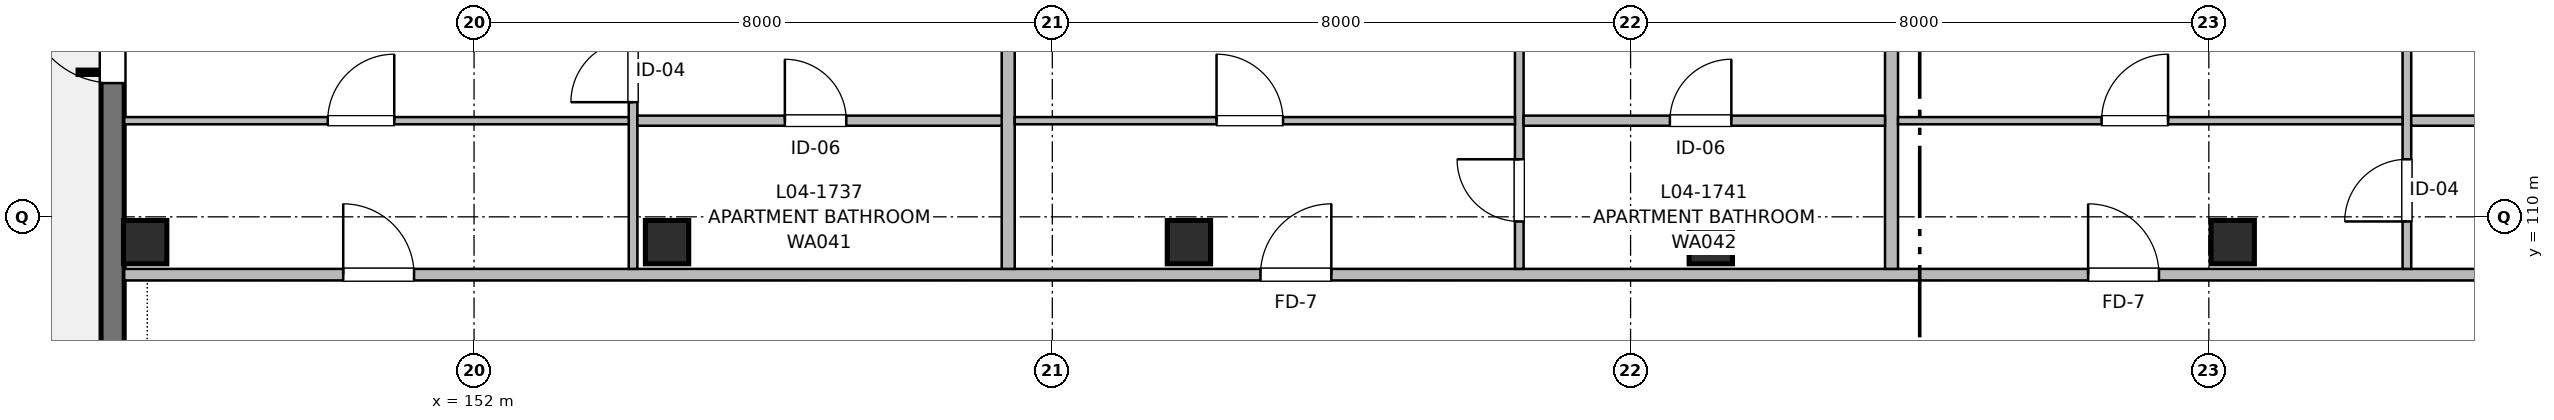
"""IFC4 building model, lengths in metres.
Left out: names, types, materials, properties, quantities, classifications, styles, units other than length and angle.
Written with IfcOpenShell. Run it as: python <this file> out.ifc"""

import sys

from ifc_helpers import new_model, si_unit, direction, frame, frame_2d, origin, origin_2d, place, context, subcontext, project, spatial, rectangle, extrude, element, fill, save


model = new_model("IFC4")
c1 = context("Model", 3, precision=1e-05, world=origin(), true_north=direction((0.0, 1.0)))
c2 = subcontext(c1, "Body", "Model", "MODEL_VIEW")
j1 = project(units=[si_unit("LENGTHUNIT", "METRE"), si_unit("PLANEANGLEUNIT", "RADIAN")], contexts=[c1])
p1 = place(None, origin())
s1 = spatial("IfcSite", under=j1, at=p1, CompositionType="ELEMENT")
p2 = place(p1, origin())
s2 = spatial("IfcBuilding", under=s1, at=p2, CompositionType="ELEMENT")
p3 = place(p2, frame((0.0, 0.0, 13.76)))
s3 = spatial("IfcBuildingStorey", under=s2, at=p3, CompositionType="ELEMENT", Elevation=13.76)
for number, where, z_axis, x_axis in (
    (1, (147.45, 109.65, 0.0), (0.0, 0.0, 1.0), (1.0, 0.0, 0.0)),
    (2, (154.67, 109.65, 0.0), (0.0, 0.0, 1.0), (1.0, 0.0, 0.0)),
    (3, (161.89, 109.65, 0.0), (0.0, 0.0, 1.0), (1.0, 0.0, 0.0)),
    (4, (169.11, 109.65, 0.0), (0.0, 0.0, 1.0), (1.0, 0.0, 0.0)),
    (5, (176.33, 109.65, 0.0), (0.0, 0.0, 1.0), (1.0, 0.0, 0.0)),
):
    element("IfcColumn", number, at=place(p3, frame(where, z_axis=z_axis, x_axis=x_axis)), inside=s3, PredefinedType="COLUMN", context=c2, shape_type="SweptSolid", body=[
        extrude(rectangle(XDim=0.6, YDim=0.6, at=origin_2d()), origin(), (0.0, 0.0, 1.0), 3.2),
    ])
p4 = place(p3, frame((147.0, 100.0, 0.0), z_axis=(0.0, 0.0, 1.0), x_axis=(0.0, 1.0, 0.0)))
e6 = element("IfcWall", 6, at=p4, inside=s3, PredefinedType="SHEAR", context=c2, shape_type="SweptSolid", body=[
    extrude(rectangle(XDim=16.0, YDim=0.32, at=frame_2d((8.0, 0.0))), origin(), (0.0, 0.0, 1.0), 2.98),
])
p5 = place(p4, frame((3.1, 0.0, 0.72)))
e7 = element("IfcOpeningElement", 7, at=p5, cuts=e6, PredefinedType="OPENING", context=c2, shape_type="SweptSolid", body=[
    extrude(rectangle(XDim=1.8, YDim=1.5, at=frame_2d((0.9, 0.75))), frame((0.0, 0.17, 0.0), z_axis=(0.0, -1.0, 0.0), x_axis=(1.0, 0.0, 0.0)), (0.0, 0.0, 1.0), 0.34),
])
p6 = place(p4, frame((11.85, 0.0, 0.0)))
e8 = element("IfcOpeningElement", 8, at=p6, cuts=e6, PredefinedType="OPENING", context=c2, shape_type="SweptSolid", body=[
    extrude(rectangle(XDim=1.2, YDim=2.2, at=frame_2d((0.6, 1.1))), frame((0.0, 0.17, 0.0), z_axis=(0.0, -1.0, 0.0), x_axis=(1.0, 0.0, 0.0)), (0.0, 0.0, 1.0), 0.34),
])
p7 = place(p3, frame((147.16, 109.2, 0.0), z_axis=(0.0, 0.0, 1.0), x_axis=(1.0, 0.0, 0.0)))
e9 = element("IfcWall", 9, at=p7, inside=s3, PredefinedType="PARTITIONING", context=c2, shape_type="SweptSolid", body=[
    extrude(rectangle(XDim=36.68, YDim=0.16, at=frame_2d((18.34, 0.0))), origin(), (0.0, 0.0, 1.0), 2.935),
])
p8 = place(p7, frame((3.03, 0.0, 0.0)))
e10 = element("IfcOpeningElement", 10, at=p8, cuts=e9, PredefinedType="OPENING", context=c2, shape_type="SweptSolid", body=[
    extrude(rectangle(XDim=0.98, YDim=2.15, at=frame_2d((0.49, 1.075))), frame((0.0, 0.09, 0.0), z_axis=(0.0, -1.0, 0.0), x_axis=(1.0, 0.0, 0.0)), (0.0, 0.0, 1.0), 0.18),
])
p9 = place(p7, frame((15.72, 0.0, 0.0)))
e11 = element("IfcOpeningElement", 11, at=p9, cuts=e9, PredefinedType="OPENING", context=c2, shape_type="SweptSolid", body=[
    extrude(rectangle(XDim=0.98, YDim=2.15, at=frame_2d((0.49, 1.075))), frame((0.0, 0.09, 0.0), z_axis=(0.0, -1.0, 0.0), x_axis=(1.0, 0.0, 0.0)), (0.0, 0.0, 1.0), 0.18),
])
p10 = place(p7, frame((27.17, 0.0, 0.0)))
e12 = element("IfcOpeningElement", 12, at=p10, cuts=e9, PredefinedType="OPENING", context=c2, shape_type="SweptSolid", body=[
    extrude(rectangle(XDim=0.98, YDim=2.15, at=frame_2d((0.49, 1.075))), frame((0.0, 0.09, 0.0), z_axis=(0.0, -1.0, 0.0), x_axis=(1.0, 0.0, 0.0)), (0.0, 0.0, 1.0), 0.18),
])
for number, where, z_axis, x_axis in (
    (13, (159.39, 109.28, 0.0), (0.0, 0.0, 1.0), (0.0, 1.0, 0.0)),
    (14, (171.61, 109.28, 0.0), (0.0, 0.0, 1.0), (0.0, 1.0, 0.0)),
):
    element("IfcWall", number, at=place(p3, frame(where, z_axis=z_axis, x_axis=x_axis)), inside=s3, PredefinedType="PARTITIONING", context=c2, shape_type="SweptSolid", body=[
        extrude(rectangle(XDim=6.6, YDim=0.18, at=frame_2d((3.3, 0.0))), origin(), (0.0, 0.0, 1.0), 2.935),
    ])
p11 = place(p3, frame((154.2, 109.28, 0.0), z_axis=(0.0, 0.0, 1.0), x_axis=(0.0, 1.0, 0.0)))
e15 = element("IfcWall", 15, at=p11, inside=s3, PredefinedType="PARTITIONING", context=c2, shape_type="SweptSolid", body=[
    extrude(rectangle(XDim=6.6, YDim=0.12, at=frame_2d((3.3, 0.0))), origin(), (0.0, 0.0, 1.0), 2.935),
])
p12 = place(p11, frame((2.306, 0.0, 0.0)))
e16 = element("IfcOpeningElement", 16, at=p12, cuts=e15, PredefinedType="OPENING", context=c2, shape_type="SweptSolid", body=[
    extrude(rectangle(XDim=0.86, YDim=2.1, at=frame_2d((0.43, 1.05))), frame((0.0, 0.07, 0.0), z_axis=(0.0, -1.0, 0.0), x_axis=(1.0, 0.0, 0.0)), (0.0, 0.0, 1.0), 0.14),
])
p13 = place(p11, frame((4.097, 0.0, 0.0)))
e17 = element("IfcOpeningElement", 17, at=p13, cuts=e15, PredefinedType="OPENING", context=c2, shape_type="SweptSolid", body=[
    extrude(rectangle(XDim=0.9, YDim=2.1, at=frame_2d((0.45, 1.05))), frame((0.0, 0.07, 0.0), z_axis=(0.0, -1.0, 0.0), x_axis=(1.0, 0.0, 0.0)), (0.0, 0.0, 1.0), 0.14),
])
p14 = place(p3, frame((154.26, 111.33, 0.0), z_axis=(0.0, 0.0, 1.0), x_axis=(1.0, 0.0, 0.0)))
e18 = element("IfcWall", 18, at=p14, inside=s3, PredefinedType="PARTITIONING", context=c2, shape_type="SweptSolid", body=[
    extrude(rectangle(XDim=5.04, YDim=0.14, at=frame_2d((2.52, 0.0))), origin(), (0.0, 0.0, 1.0), 2.935),
])
p15 = place(p14, frame((2.04, 0.0, 0.0)))
e19 = element("IfcOpeningElement", 19, at=p15, cuts=e18, PredefinedType="OPENING", context=c2, shape_type="SweptSolid", body=[
    extrude(rectangle(XDim=0.85, YDim=2.05, at=frame_2d((0.425, 1.025))), frame((0.0, 0.08, 0.0), z_axis=(0.0, -1.0, 0.0), x_axis=(1.0, 0.0, 0.0)), (0.0, 0.0, 1.0), 0.16),
])
p16 = place(p3, frame((147.16, 111.33, 0.0), z_axis=(0.0, 0.0, 1.0), x_axis=(1.0, 0.0, 0.0)))
e20 = element("IfcWall", 20, at=p16, inside=s3, PredefinedType="PARTITIONING", context=c2, shape_type="SweptSolid", body=[
    extrude(rectangle(XDim=6.98, YDim=0.1, at=frame_2d((3.49, 0.0))), origin(), (0.0, 0.0, 1.0), 2.935),
])
p17 = place(p16, frame((2.816, 0.0, 0.0)))
e21 = element("IfcOpeningElement", 21, at=p17, cuts=e20, PredefinedType="OPENING", context=c2, shape_type="SweptSolid", body=[
    extrude(rectangle(XDim=0.92, YDim=2.1, at=frame_2d((0.46, 1.05))), frame((0.0, 0.06, 0.0), z_axis=(0.0, -1.0, 0.0), x_axis=(1.0, 0.0, 0.0)), (0.0, 0.0, 1.0), 0.12),
])
p18 = place(p3, frame((166.46, 109.28, 0.0), z_axis=(0.0, 0.0, 1.0), x_axis=(0.0, 1.0, 0.0)))
e22 = element("IfcWall", 22, at=p18, inside=s3, PredefinedType="PARTITIONING", context=c2, shape_type="SweptSolid", body=[
    extrude(rectangle(XDim=6.6, YDim=0.12, at=frame_2d((3.3, 0.0))), origin(), (0.0, 0.0, 1.0), 2.935),
])
p19 = place(p18, frame((0.656, 0.0, 0.0)))
e23 = element("IfcOpeningElement", 23, at=p19, cuts=e22, PredefinedType="OPENING", context=c2, shape_type="SweptSolid", body=[
    extrude(rectangle(XDim=0.86, YDim=2.1, at=frame_2d((0.43, 1.05))), frame((0.0, 0.07, 0.0), z_axis=(0.0, -1.0, 0.0), x_axis=(1.0, 0.0, 0.0)), (0.0, 0.0, 1.0), 0.14),
])
p20 = place(p18, frame((4.097, 0.0, 0.0)))
e24 = element("IfcOpeningElement", 24, at=p20, cuts=e22, PredefinedType="OPENING", context=c2, shape_type="SweptSolid", body=[
    extrude(rectangle(XDim=0.9, YDim=2.1, at=frame_2d((0.45, 1.05))), frame((0.0, 0.07, 0.0), z_axis=(0.0, -1.0, 0.0), x_axis=(1.0, 0.0, 0.0)), (0.0, 0.0, 1.0), 0.14),
])
p21 = place(p3, frame((166.52, 111.33, 0.0), z_axis=(0.0, 0.0, 1.0), x_axis=(1.0, 0.0, 0.0)))
e25 = element("IfcWall", 25, at=p21, inside=s3, PredefinedType="PARTITIONING", context=c2, shape_type="SweptSolid", body=[
    extrude(rectangle(XDim=5.0, YDim=0.14, at=frame_2d((2.5, 0.0))), origin(), (0.0, 0.0, 1.0), 2.935),
])
p22 = place(p21, frame((2.024, 0.0, 0.0)))
e26 = element("IfcOpeningElement", 26, at=p22, cuts=e25, PredefinedType="OPENING", context=c2, shape_type="SweptSolid", body=[
    extrude(rectangle(XDim=0.85, YDim=2.05, at=frame_2d((0.425, 1.025))), frame((0.0, 0.08, 0.0), z_axis=(0.0, -1.0, 0.0), x_axis=(1.0, 0.0, 0.0)), (0.0, 0.0, 1.0), 0.16),
])
p23 = place(p3, frame((159.48, 111.33, 0.0), z_axis=(0.0, 0.0, 1.0), x_axis=(1.0, 0.0, 0.0)))
e27 = element("IfcWall", 27, at=p23, inside=s3, PredefinedType="PARTITIONING", context=c2, shape_type="SweptSolid", body=[
    extrude(rectangle(XDim=6.92, YDim=0.1, at=frame_2d((3.46, 0.0))), origin(), (0.0, 0.0, 1.0), 2.935),
])
p24 = place(p23, frame((2.792, 0.0, 0.0)))
e28 = element("IfcOpeningElement", 28, at=p24, cuts=e27, PredefinedType="OPENING", context=c2, shape_type="SweptSolid", body=[
    extrude(rectangle(XDim=0.92, YDim=2.1, at=frame_2d((0.46, 1.05))), frame((0.0, 0.06, 0.0), z_axis=(0.0, -1.0, 0.0), x_axis=(1.0, 0.0, 0.0)), (0.0, 0.0, 1.0), 0.12),
])
p25 = place(p3, frame((178.74, 109.28, 0.0), z_axis=(0.0, 0.0, 1.0), x_axis=(0.0, 1.0, 0.0)))
e29 = element("IfcWall", 29, at=p25, inside=s3, PredefinedType="PARTITIONING", context=c2, shape_type="SweptSolid", body=[
    extrude(rectangle(XDim=6.6, YDim=0.12, at=frame_2d((3.3, 0.0))), origin(), (0.0, 0.0, 1.0), 2.935),
])
p26 = place(p25, frame((0.656, 0.0, 0.0)))
e30 = element("IfcOpeningElement", 30, at=p26, cuts=e29, PredefinedType="OPENING", context=c2, shape_type="SweptSolid", body=[
    extrude(rectangle(XDim=0.86, YDim=2.1, at=frame_2d((0.43, 1.05))), frame((0.0, 0.07, 0.0), z_axis=(0.0, -1.0, 0.0), x_axis=(1.0, 0.0, 0.0)), (0.0, 0.0, 1.0), 0.14),
])
p27 = place(p25, frame((4.097, 0.0, 0.0)))
e31 = element("IfcOpeningElement", 31, at=p27, cuts=e29, PredefinedType="OPENING", context=c2, shape_type="SweptSolid", body=[
    extrude(rectangle(XDim=0.9, YDim=2.1, at=frame_2d((0.45, 1.05))), frame((0.0, 0.07, 0.0), z_axis=(0.0, -1.0, 0.0), x_axis=(1.0, 0.0, 0.0)), (0.0, 0.0, 1.0), 0.14),
])
p28 = place(p3, frame((178.8, 111.33, 0.0), z_axis=(0.0, 0.0, 1.0), x_axis=(1.0, 0.0, 0.0)))
e32 = element("IfcWall", 32, at=p28, inside=s3, PredefinedType="PARTITIONING", context=c2, shape_type="SweptSolid", body=[
    extrude(rectangle(XDim=5.04, YDim=0.14, at=frame_2d((2.52, 0.0))), origin(), (0.0, 0.0, 1.0), 2.935),
])
p29 = place(p28, frame((2.04, 0.0, 0.0)))
e33 = element("IfcOpeningElement", 33, at=p29, cuts=e32, PredefinedType="OPENING", context=c2, shape_type="SweptSolid", body=[
    extrude(rectangle(XDim=0.85, YDim=2.05, at=frame_2d((0.425, 1.025))), frame((0.0, 0.08, 0.0), z_axis=(0.0, -1.0, 0.0), x_axis=(1.0, 0.0, 0.0)), (0.0, 0.0, 1.0), 0.16),
])
p30 = place(p3, frame((171.7, 111.33, 0.0), z_axis=(0.0, 0.0, 1.0), x_axis=(1.0, 0.0, 0.0)))
e34 = element("IfcWall", 34, at=p30, inside=s3, PredefinedType="PARTITIONING", context=c2, shape_type="SweptSolid", body=[
    extrude(rectangle(XDim=6.98, YDim=0.1, at=frame_2d((3.49, 0.0))), origin(), (0.0, 0.0, 1.0), 2.935),
])
p31 = place(p30, frame((2.816, 0.0, 0.0)))
e35 = element("IfcOpeningElement", 35, at=p31, cuts=e34, PredefinedType="OPENING", context=c2, shape_type="SweptSolid", body=[
    extrude(rectangle(XDim=0.92, YDim=2.1, at=frame_2d((0.46, 1.05))), frame((0.0, 0.06, 0.0), z_axis=(0.0, -1.0, 0.0), x_axis=(1.0, 0.0, 0.0)), (0.0, 0.0, 1.0), 0.12),
])
p32 = place(p6, origin())
e36 = element("IfcDoor", 36, at=p32, inside=s3, OperationType="SINGLE_SWING_RIGHT", PredefinedType="DOOR", context=c2, shape_type="SweptSolid", body=[
    extrude(rectangle(XDim=1.2, YDim=2.2, at=frame_2d((0.6, 1.1))), frame((0.0, 0.025, 0.0), z_axis=(0.0, -1.0, 0.0), x_axis=(1.0, 0.0, 0.0)), (0.0, 0.0, 1.0), 0.05),
])
fill(e8, e36)
p33 = place(p8, origin())
e37 = element("IfcDoor", 37, at=p33, inside=s3, OperationType="SINGLE_SWING_LEFT", PredefinedType="DOOR", context=c2, shape_type="SweptSolid", body=[
    extrude(rectangle(XDim=0.98, YDim=2.15, at=frame_2d((0.49, 1.075))), frame((0.0, 0.025, 0.0), z_axis=(0.0, -1.0, 0.0), x_axis=(1.0, 0.0, 0.0)), (0.0, 0.0, 1.0), 0.05),
])
fill(e10, e37)
p34 = place(p17, origin())
e38 = element("IfcDoor", 38, at=p34, inside=s3, OperationType="SINGLE_SWING_RIGHT", PredefinedType="DOOR", context=c2, shape_type="SweptSolid", body=[
    extrude(rectangle(XDim=0.92, YDim=2.1, at=frame_2d((0.46, 1.05))), frame((0.0, 0.025, 0.0), z_axis=(0.0, -1.0, 0.0), x_axis=(1.0, 0.0, 0.0)), (0.0, 0.0, 1.0), 0.05),
])
fill(e21, e38)
p35 = place(p12, origin())
e39 = element("IfcDoor", 39, at=p35, inside=s3, OperationType="SINGLE_SWING_LEFT", PredefinedType="DOOR", context=c2, shape_type="SweptSolid", body=[
    extrude(rectangle(XDim=0.86, YDim=2.1, at=frame_2d((0.43, 1.05))), frame((0.0, 0.025, 0.0), z_axis=(0.0, -1.0, 0.0), x_axis=(1.0, 0.0, 0.0)), (0.0, 0.0, 1.0), 0.05),
])
fill(e16, e39)
p36 = place(p15, origin())
e40 = element("IfcDoor", 40, at=p36, inside=s3, OperationType="SINGLE_SWING_LEFT", PredefinedType="DOOR", context=c2, shape_type="SweptSolid", body=[
    extrude(rectangle(XDim=0.85, YDim=2.05, at=frame_2d((0.425, 1.025))), frame((0.0, 0.025, 0.0), z_axis=(0.0, -1.0, 0.0), x_axis=(1.0, 0.0, 0.0)), (0.0, 0.0, 1.0), 0.05),
])
fill(e19, e40)
p37 = place(p9, origin())
e41 = element("IfcDoor", 41, at=p37, inside=s3, OperationType="SINGLE_SWING_RIGHT", PredefinedType="DOOR", context=c2, shape_type="SweptSolid", body=[
    extrude(rectangle(XDim=0.98, YDim=2.15, at=frame_2d((0.49, 1.075))), frame((0.0, 0.025, 0.0), z_axis=(0.0, -1.0, 0.0), x_axis=(1.0, 0.0, 0.0)), (0.0, 0.0, 1.0), 0.05),
])
fill(e11, e41)
p38 = place(p24, origin())
e42 = element("IfcDoor", 42, at=p38, inside=s3, OperationType="SINGLE_SWING_LEFT", PredefinedType="DOOR", context=c2, shape_type="SweptSolid", body=[
    extrude(rectangle(XDim=0.92, YDim=2.1, at=frame_2d((0.46, 1.05))), frame((0.0, 0.025, 0.0), z_axis=(0.0, -1.0, 0.0), x_axis=(1.0, 0.0, 0.0)), (0.0, 0.0, 1.0), 0.05),
])
fill(e28, e42)
p39 = place(p19, origin())
e43 = element("IfcDoor", 43, at=p39, inside=s3, OperationType="SINGLE_SWING_RIGHT", PredefinedType="DOOR", context=c2, shape_type="SweptSolid", body=[
    extrude(rectangle(XDim=0.86, YDim=2.1, at=frame_2d((0.43, 1.05))), frame((0.0, 0.025, 0.0), z_axis=(0.0, -1.0, 0.0), x_axis=(1.0, 0.0, 0.0)), (0.0, 0.0, 1.0), 0.05),
])
fill(e23, e43)
p40 = place(p22, origin())
e44 = element("IfcDoor", 44, at=p40, inside=s3, OperationType="SINGLE_SWING_RIGHT", PredefinedType="DOOR", context=c2, shape_type="SweptSolid", body=[
    extrude(rectangle(XDim=0.85, YDim=2.05, at=frame_2d((0.425, 1.025))), frame((0.0, 0.025, 0.0), z_axis=(0.0, -1.0, 0.0), x_axis=(1.0, 0.0, 0.0)), (0.0, 0.0, 1.0), 0.05),
])
fill(e26, e44)
p41 = place(p10, origin())
e45 = element("IfcDoor", 45, at=p41, inside=s3, OperationType="SINGLE_SWING_LEFT", PredefinedType="DOOR", context=c2, shape_type="SweptSolid", body=[
    extrude(rectangle(XDim=0.98, YDim=2.15, at=frame_2d((0.49, 1.075))), frame((0.0, 0.025, 0.0), z_axis=(0.0, -1.0, 0.0), x_axis=(1.0, 0.0, 0.0)), (0.0, 0.0, 1.0), 0.05),
])
fill(e12, e45)
p42 = place(p31, origin())
e46 = element("IfcDoor", 46, at=p42, inside=s3, OperationType="SINGLE_SWING_RIGHT", PredefinedType="DOOR", context=c2, shape_type="SweptSolid", body=[
    extrude(rectangle(XDim=0.92, YDim=2.1, at=frame_2d((0.46, 1.05))), frame((0.0, 0.025, 0.0), z_axis=(0.0, -1.0, 0.0), x_axis=(1.0, 0.0, 0.0)), (0.0, 0.0, 1.0), 0.05),
])
fill(e35, e46)
p43 = place(p26, origin())
e47 = element("IfcDoor", 47, at=p43, inside=s3, OperationType="SINGLE_SWING_LEFT", PredefinedType="DOOR", context=c2, shape_type="SweptSolid", body=[
    extrude(rectangle(XDim=0.86, YDim=2.1, at=frame_2d((0.43, 1.05))), frame((0.0, 0.025, 0.0), z_axis=(0.0, -1.0, 0.0), x_axis=(1.0, 0.0, 0.0)), (0.0, 0.0, 1.0), 0.05),
])
fill(e30, e47)
save(model, sys.argv[1])
